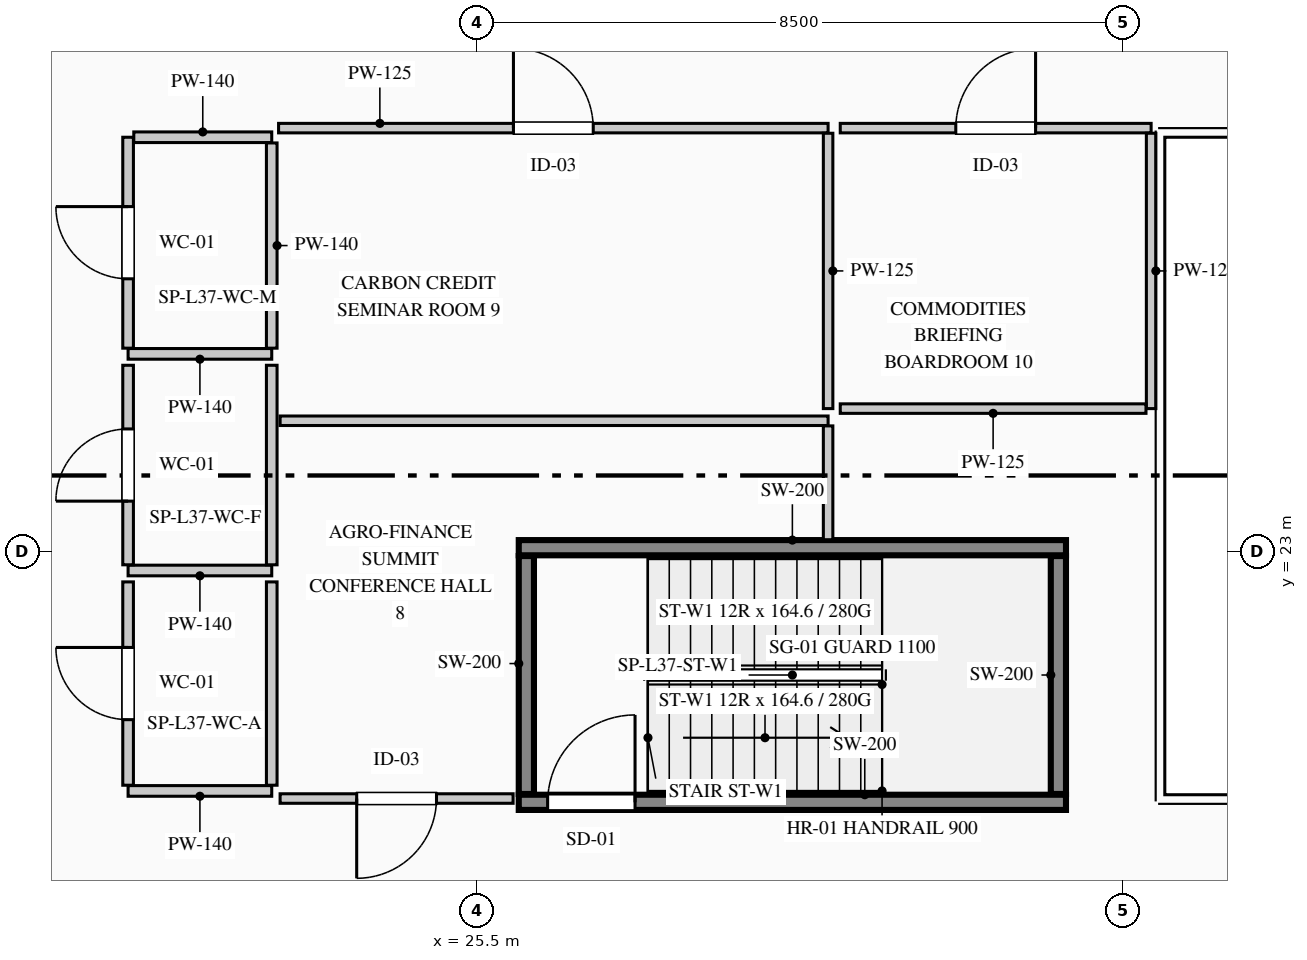
"""IFC4 building model, lengths in metres.
Left out: names, types, materials, properties, quantities, classifications, styles, units other than length and angle.
Written with IfcOpenShell. Run it as: python <this file> out.ifc"""

import sys

from ifc_helpers import new_model, si_unit, direction, frame, frame_2d, origin, place, context, subcontext, project, spatial, rectangle, extrude, element, fill, save


model = new_model("IFC4")
c1 = context("Model", 3, precision=1e-05, world=origin(), true_north=direction((0.0, 1.0)))
c2 = subcontext(c1, "Body", "Model", "MODEL_VIEW")
j1 = project(units=[si_unit("LENGTHUNIT", "METRE"), si_unit("PLANEANGLEUNIT", "RADIAN")], contexts=[c1])
p1 = place(None, origin())
s1 = spatial("IfcSite", under=j1, at=p1, CompositionType="ELEMENT")
p2 = place(p1, origin())
s2 = spatial("IfcBuilding", under=s1, at=p2, CompositionType="ELEMENT")
p3 = place(p2, frame((0.0, 0.0, 158.8)))
s3 = spatial("IfcBuildingStorey", under=s2, at=p3, CompositionType="ELEMENT", Elevation=158.8)
p4 = place(p3, frame((26.05, 19.7, 0.0), z_axis=(0.0, 0.0, 1.0), x_axis=(1.0, 0.0, 0.0)))
e1 = element("IfcWall", 1, at=p4, inside=s3, PredefinedType="SHEAR", context=c2, shape_type="SweptSolid", body=[
    extrude(rectangle(XDim=7.2, YDim=0.2, at=frame_2d((3.6, 0.0))), origin(), (0.0, 0.0, 1.0), 3.95),
])
p5 = place(p4, frame((0.38, 0.0, 0.0)))
e2 = element("IfcOpeningElement", 2, at=p5, cuts=e1, PredefinedType="OPENING", context=c2, shape_type="SweptSolid", body=[
    extrude(rectangle(XDim=1.15, YDim=2.2, at=frame_2d((0.575, 1.1))), frame((0.0, 0.11, 0.0), z_axis=(0.0, -1.0, 0.0), x_axis=(1.0, 0.0, 0.0)), (0.0, 0.0, 1.0), 0.22),
])
p6 = place(p3, frame((26.05, 23.05, 0.0), z_axis=(0.0, 0.0, 1.0), x_axis=(1.0, 0.0, 0.0)))
e3 = element("IfcWall", 3, at=p6, inside=s3, PredefinedType="SHEAR", context=c2, shape_type="SweptSolid", body=[
    extrude(rectangle(XDim=7.2, YDim=0.2, at=frame_2d((3.6, 0.0))), origin(), (0.0, 0.0, 1.0), 3.95),
])
for number, where, z_axis, x_axis in (
    (4, (26.15, 19.81, 0.0), (0.0, 0.0, 1.0), (0.0, 1.0, 0.0)),
    (5, (33.15, 19.81, 0.0), (0.0, 0.0, 1.0), (0.0, 1.0, 0.0)),
):
    element("IfcWall", number, at=place(p3, frame(where, z_axis=z_axis, x_axis=x_axis)), inside=s3, PredefinedType="SHEAR", context=c2, shape_type="SweptSolid", body=[
        extrude(rectangle(XDim=3.13, YDim=0.2, at=frame_2d((1.565, 0.0))), origin(), (0.0, 0.0, 1.0), 3.95),
    ])
p7 = place(p3, frame((22.8, 25.6, 0.0), z_axis=(0.0, 0.0, 1.0), x_axis=(-1.0, 0.0, 0.0)))
e6 = element("IfcWall", 6, at=p7, inside=s3, PredefinedType="PARTITIONING", context=c2, shape_type="SweptSolid", body=[
    extrude(rectangle(XDim=1.89, YDim=0.14, at=frame_2d((0.945, 0.0))), origin(), (0.0, 0.0, 1.0), 3.69),
])
p8 = place(p3, frame((20.91, 25.675, 0.0), z_axis=(0.0, 0.0, 1.0), x_axis=(0.0, 1.0, 0.0)))
e7 = element("IfcWall", 7, at=p8, inside=s3, PredefinedType="PARTITIONING", context=c2, shape_type="SweptSolid", body=[
    extrude(rectangle(XDim=2.775, YDim=0.14, at=frame_2d((1.387, 0.0))), origin(), (0.0, 0.0, 1.0), 3.69),
])
p9 = place(p8, frame((0.913, 0.0, 0.0)))
e8 = element("IfcOpeningElement", 8, at=p9, cuts=e7, PredefinedType="OPENING", context=c2, shape_type="SweptSolid", body=[
    extrude(rectangle(XDim=0.95, YDim=2.15, at=frame_2d((0.475, 1.075))), frame((0.0, 0.08, 0.0), z_axis=(0.0, -1.0, 0.0), x_axis=(1.0, 0.0, 0.0)), (0.0, 0.0, 1.0), 0.16),
])
p10 = place(p3, frame((20.985, 28.45, 0.0), z_axis=(0.0, 0.0, 1.0), x_axis=(1.0, 0.0, 0.0)))
e9 = element("IfcWall", 9, at=p10, inside=s3, PredefinedType="PARTITIONING", context=c2, shape_type="SweptSolid", body=[
    extrude(rectangle(XDim=1.815, YDim=0.14, at=frame_2d((0.907, 0.0))), origin(), (0.0, 0.0, 1.0), 3.69),
])
p11 = place(p3, frame((22.8, 28.375, 0.0), z_axis=(0.0, 0.0, 1.0), x_axis=(0.0, -1.0, 0.0)))
e10 = element("IfcWall", 10, at=p11, inside=s3, PredefinedType="PARTITIONING", context=c2, shape_type="SweptSolid", body=[
    extrude(rectangle(XDim=2.7, YDim=0.14, at=frame_2d((1.35, 0.0))), origin(), (0.0, 0.0, 1.0), 3.375),
])
p12 = place(p3, frame((22.8, 22.75, 0.0), z_axis=(0.0, 0.0, 1.0), x_axis=(-1.0, 0.0, 0.0)))
e11 = element("IfcWall", 11, at=p12, inside=s3, PredefinedType="PARTITIONING", context=c2, shape_type="SweptSolid", body=[
    extrude(rectangle(XDim=1.89, YDim=0.14, at=frame_2d((0.945, 0.0))), origin(), (0.0, 0.0, 1.0), 3.69),
])
p13 = place(p3, frame((20.91, 22.825, 0.0), z_axis=(0.0, 0.0, 1.0), x_axis=(0.0, 1.0, 0.0)))
e12 = element("IfcWall", 12, at=p13, inside=s3, PredefinedType="PARTITIONING", context=c2, shape_type="SweptSolid", body=[
    extrude(rectangle(XDim=2.625, YDim=0.14, at=frame_2d((1.312, 0.0))), origin(), (0.0, 0.0, 1.0), 3.69),
])
p14 = place(p13, frame((0.837, 0.0, 0.0)))
e13 = element("IfcOpeningElement", 13, at=p14, cuts=e12, PredefinedType="OPENING", context=c2, shape_type="SweptSolid", body=[
    extrude(rectangle(XDim=0.95, YDim=2.15, at=frame_2d((0.475, 1.075))), frame((0.0, 0.08, 0.0), z_axis=(0.0, -1.0, 0.0), x_axis=(1.0, 0.0, 0.0)), (0.0, 0.0, 1.0), 0.16),
])
p15 = place(p3, frame((22.8, 25.45, 0.0), z_axis=(0.0, 0.0, 1.0), x_axis=(0.0, -1.0, 0.0)))
e14 = element("IfcWall", 14, at=p15, inside=s3, PredefinedType="PARTITIONING", context=c2, shape_type="SweptSolid", body=[
    extrude(rectangle(XDim=2.625, YDim=0.14, at=frame_2d((1.312, 0.0))), origin(), (0.0, 0.0, 1.0), 3.375),
])
p16 = place(p3, frame((22.8, 19.85, 0.0), z_axis=(0.0, 0.0, 1.0), x_axis=(-1.0, 0.0, 0.0)))
e15 = element("IfcWall", 15, at=p16, inside=s3, PredefinedType="PARTITIONING", context=c2, shape_type="SweptSolid", body=[
    extrude(rectangle(XDim=1.89, YDim=0.14, at=frame_2d((0.945, 0.0))), origin(), (0.0, 0.0, 1.0), 3.69),
])
p17 = place(p3, frame((20.91, 19.925, 0.0), z_axis=(0.0, 0.0, 1.0), x_axis=(0.0, 1.0, 0.0)))
e16 = element("IfcWall", 16, at=p17, inside=s3, PredefinedType="PARTITIONING", context=c2, shape_type="SweptSolid", body=[
    extrude(rectangle(XDim=2.675, YDim=0.14, at=frame_2d((1.337, 0.0))), origin(), (0.0, 0.0, 1.0), 3.69),
])
p18 = place(p17, frame((0.863, 0.0, 0.0)))
e17 = element("IfcOpeningElement", 17, at=p18, cuts=e16, PredefinedType="OPENING", context=c2, shape_type="SweptSolid", body=[
    extrude(rectangle(XDim=0.95, YDim=2.15, at=frame_2d((0.475, 1.075))), frame((0.0, 0.08, 0.0), z_axis=(0.0, -1.0, 0.0), x_axis=(1.0, 0.0, 0.0)), (0.0, 0.0, 1.0), 0.16),
])
p19 = place(p3, frame((22.8, 22.6, 0.0), z_axis=(0.0, 0.0, 1.0), x_axis=(0.0, -1.0, 0.0)))
e18 = element("IfcWall", 18, at=p19, inside=s3, PredefinedType="PARTITIONING", context=c2, shape_type="SweptSolid", body=[
    extrude(rectangle(XDim=2.675, YDim=0.14, at=frame_2d((1.337, 0.0))), origin(), (0.0, 0.0, 1.0), 3.375),
])
p20 = place(p3, frame((25.976, 19.75, 0.0), z_axis=(0.0, 0.0, 1.0), x_axis=(-1.0, 0.0, 0.0)))
e19 = element("IfcWall", 19, at=p20, inside=s3, PredefinedType="PARTITIONING", context=c2, shape_type="SweptSolid", body=[
    extrude(rectangle(XDim=3.066, YDim=0.125, at=frame_2d((1.533, 0.0))), origin(), (0.0, 0.0, 1.0), 3.69),
])
p21 = place(p20, frame((1.008, 0.0, 0.0)))
e20 = element("IfcOpeningElement", 20, at=p21, cuts=e19, PredefinedType="OPENING", context=c2, shape_type="SweptSolid", body=[
    extrude(rectangle(XDim=1.05, YDim=2.15, at=frame_2d((0.525, 1.075))), frame((0.0, 0.073, 0.0), z_axis=(0.0, -1.0, 0.0), x_axis=(1.0, 0.0, 0.0)), (0.0, 0.0, 1.0), 0.145),
])
p22 = place(p3, frame((22.91, 24.72, 0.0), z_axis=(0.0, 0.0, 1.0), x_axis=(1.0, 0.0, 0.0)))
e21 = element("IfcWall", 21, at=p22, inside=s3, PredefinedType="PARTITIONING", context=c2, shape_type="SweptSolid", body=[
    extrude(rectangle(XDim=7.21, YDim=0.125, at=frame_2d((3.605, 0.0))), origin(), (0.0, 0.0, 1.0), 3.375),
])
p23 = place(p3, frame((30.12, 24.653, 0.0), z_axis=(0.0, 0.0, 1.0), x_axis=(0.0, -1.0, 0.0)))
e22 = element("IfcWall", 22, at=p23, inside=s3, PredefinedType="PARTITIONING", context=c2, shape_type="SweptSolid", body=[
    extrude(rectangle(XDim=1.498, YDim=0.125, at=frame_2d((0.749, 0.0))), origin(), (0.0, 0.0, 1.0), 3.69),
])
p24 = place(p3, frame((22.89, 28.57, 0.0), z_axis=(0.0, 0.0, 1.0), x_axis=(1.0, 0.0, 0.0)))
e23 = element("IfcWall", 23, at=p24, inside=s3, PredefinedType="PARTITIONING", context=c2, shape_type="SweptSolid", body=[
    extrude(rectangle(XDim=7.23, YDim=0.125, at=frame_2d((3.615, 0.0))), origin(), (0.0, 0.0, 1.0), 3.375),
])
p25 = place(p24, frame((3.09, 0.0, 0.0)))
e24 = element("IfcOpeningElement", 24, at=p25, cuts=e23, PredefinedType="OPENING", context=c2, shape_type="SweptSolid", body=[
    extrude(rectangle(XDim=1.05, YDim=2.15, at=frame_2d((0.525, 1.075))), frame((0.0, 0.073, 0.0), z_axis=(0.0, -1.0, 0.0), x_axis=(1.0, 0.0, 0.0)), (0.0, 0.0, 1.0), 0.145),
])
p26 = place(p3, frame((30.12, 28.502, 0.0), z_axis=(0.0, 0.0, 1.0), x_axis=(0.0, -1.0, 0.0)))
e25 = element("IfcWall", 25, at=p26, inside=s3, PredefinedType="PARTITIONING", context=c2, shape_type="SweptSolid", body=[
    extrude(rectangle(XDim=3.623, YDim=0.125, at=frame_2d((1.811, 0.0))), origin(), (0.0, 0.0, 1.0), 3.69),
])
p27 = place(p3, frame((30.28, 28.57, 0.0), z_axis=(0.0, 0.0, 1.0), x_axis=(1.0, 0.0, 0.0)))
e26 = element("IfcWall", 26, at=p27, inside=s3, PredefinedType="PARTITIONING", context=c2, shape_type="SweptSolid", body=[
    extrude(rectangle(XDim=4.09, YDim=0.125, at=frame_2d((2.045, 0.0))), origin(), (0.0, 0.0, 1.0), 3.375),
])
p28 = place(p27, frame((1.52, 0.0, 0.0)))
e27 = element("IfcOpeningElement", 27, at=p28, cuts=e26, PredefinedType="OPENING", context=c2, shape_type="SweptSolid", body=[
    extrude(rectangle(XDim=1.05, YDim=2.15, at=frame_2d((0.525, 1.075))), frame((0.0, 0.073, 0.0), z_axis=(0.0, -1.0, 0.0), x_axis=(1.0, 0.0, 0.0)), (0.0, 0.0, 1.0), 0.145),
])
p29 = place(p3, frame((34.37, 28.502, 0.0), z_axis=(0.0, 0.0, 1.0), x_axis=(0.0, -1.0, 0.0)))
e28 = element("IfcWall", 28, at=p29, inside=s3, PredefinedType="PARTITIONING", context=c2, shape_type="SweptSolid", body=[
    extrude(rectangle(XDim=3.623, YDim=0.125, at=frame_2d((1.811, 0.0))), origin(), (0.0, 0.0, 1.0), 3.69),
])
p30 = place(p3, frame((34.302, 24.88, 0.0), z_axis=(0.0, 0.0, 1.0), x_axis=(-1.0, 0.0, 0.0)))
e29 = element("IfcWall", 29, at=p30, inside=s3, PredefinedType="PARTITIONING", context=c2, shape_type="SweptSolid", body=[
    extrude(rectangle(XDim=4.022, YDim=0.125, at=frame_2d((2.011, 0.0))), origin(), (0.0, 0.0, 1.0), 3.375),
])
p31 = place(p5, origin())
e30 = element("IfcDoor", 30, at=p31, inside=s3, OperationType="SINGLE_SWING_RIGHT", PredefinedType="DOOR", context=c2, shape_type="SweptSolid", body=[
    extrude(rectangle(XDim=1.15, YDim=2.2, at=frame_2d((0.575, 1.1))), frame((0.0, 0.025, 0.0), z_axis=(0.0, -1.0, 0.0), x_axis=(1.0, 0.0, 0.0)), (0.0, 0.0, 1.0), 0.05),
])
fill(e2, e30)
p32 = place(p9, origin())
e31 = element("IfcDoor", 31, at=p32, inside=s3, OperationType="SINGLE_SWING_RIGHT", PredefinedType="DOOR", context=c2, shape_type="SweptSolid", body=[
    extrude(rectangle(XDim=0.95, YDim=2.15, at=frame_2d((0.475, 1.075))), frame((0.0, 0.025, 0.0), z_axis=(0.0, -1.0, 0.0), x_axis=(1.0, 0.0, 0.0)), (0.0, 0.0, 1.0), 0.05),
])
fill(e8, e31)
p33 = place(p14, origin())
e32 = element("IfcDoor", 32, at=p33, inside=s3, OperationType="SINGLE_SWING_LEFT", PredefinedType="DOOR", context=c2, shape_type="SweptSolid", body=[
    extrude(rectangle(XDim=0.95, YDim=2.15, at=frame_2d((0.475, 1.075))), frame((0.0, 0.025, 0.0), z_axis=(0.0, -1.0, 0.0), x_axis=(1.0, 0.0, 0.0)), (0.0, 0.0, 1.0), 0.05),
])
fill(e13, e32)
p34 = place(p18, origin())
e33 = element("IfcDoor", 33, at=p34, inside=s3, OperationType="SINGLE_SWING_RIGHT", PredefinedType="DOOR", context=c2, shape_type="SweptSolid", body=[
    extrude(rectangle(XDim=0.95, YDim=2.15, at=frame_2d((0.475, 1.075))), frame((0.0, 0.025, 0.0), z_axis=(0.0, -1.0, 0.0), x_axis=(1.0, 0.0, 0.0)), (0.0, 0.0, 1.0), 0.05),
])
fill(e17, e33)
p35 = place(p21, origin())
e34 = element("IfcDoor", 34, at=p35, inside=s3, OperationType="SINGLE_SWING_RIGHT", PredefinedType="DOOR", context=c2, shape_type="SweptSolid", body=[
    extrude(rectangle(XDim=1.05, YDim=2.15, at=frame_2d((0.525, 1.075))), frame((0.0, 0.025, 0.0), z_axis=(0.0, -1.0, 0.0), x_axis=(1.0, 0.0, 0.0)), (0.0, 0.0, 1.0), 0.05),
])
fill(e20, e34)
p36 = place(p25, origin())
e35 = element("IfcDoor", 35, at=p36, inside=s3, OperationType="SINGLE_SWING_LEFT", PredefinedType="DOOR", context=c2, shape_type="SweptSolid", body=[
    extrude(rectangle(XDim=1.05, YDim=2.15, at=frame_2d((0.525, 1.075))), frame((0.0, 0.025, 0.0), z_axis=(0.0, -1.0, 0.0), x_axis=(1.0, 0.0, 0.0)), (0.0, 0.0, 1.0), 0.05),
])
fill(e24, e35)
p37 = place(p28, origin())
e36 = element("IfcDoor", 36, at=p37, inside=s3, OperationType="SINGLE_SWING_RIGHT", PredefinedType="DOOR", context=c2, shape_type="SweptSolid", body=[
    extrude(rectangle(XDim=1.05, YDim=2.15, at=frame_2d((0.525, 1.075))), frame((0.0, 0.025, 0.0), z_axis=(0.0, -1.0, 0.0), x_axis=(1.0, 0.0, 0.0)), (0.0, 0.0, 1.0), 0.05),
])
fill(e27, e36)
save(model, sys.argv[1])
